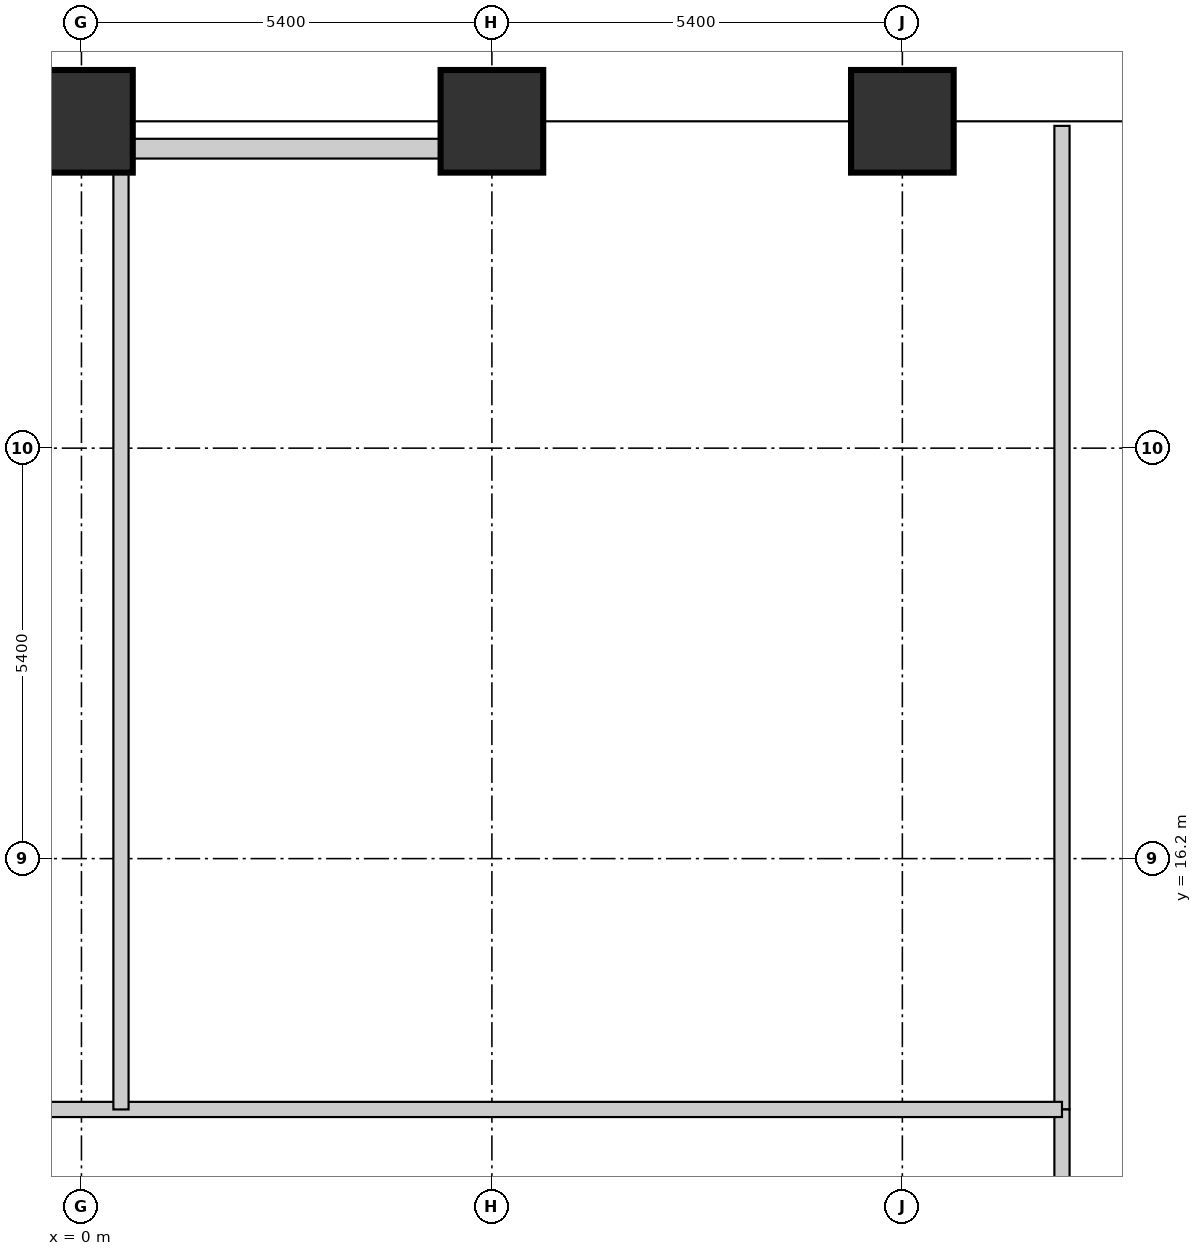
"""IFC4 building model, lengths in metres.
Left out: names, types, materials, properties, quantities, classifications, styles, units other than length and angle.
Written with IfcOpenShell. Run it as: python <this file> out.ifc"""

import sys

from ifc_helpers import new_model, si_unit, direction, frame, frame_2d, origin, origin_2d, place, context, subcontext, project, spatial, rectangle, extrude, element, fill, save


model = new_model("IFC4")
c1 = context("Model", 3, precision=1e-05, world=origin(), true_north=direction((0.0, 1.0)))
c2 = subcontext(c1, "Body", "Model", "MODEL_VIEW")
j1 = project(units=[si_unit("LENGTHUNIT", "METRE"), si_unit("PLANEANGLEUNIT", "RADIAN")], contexts=[c1])
p1 = place(None, origin())
s1 = spatial("IfcSite", under=j1, at=p1, CompositionType="ELEMENT")
p2 = place(p1, origin())
s2 = spatial("IfcBuilding", under=s1, at=p2, CompositionType="ELEMENT")
p3 = place(p2, frame((0.0, 0.0, 22.5)))
s3 = spatial("IfcBuildingStorey", under=s2, at=p3, CompositionType="ELEMENT", Elevation=22.5)
for number, where, z_axis, x_axis in (
    (1, (0.0, 25.9, 0.0), (0.0, 0.0, 1.0), (1.0, 0.0, 0.0)),
    (2, (5.4, 25.9, 0.0), (0.0, 0.0, 1.0), (1.0, 0.0, 0.0)),
    (3, (10.8, 25.9, 0.0), (0.0, 0.0, 1.0), (1.0, 0.0, 0.0)),
):
    element("IfcColumn", number, at=place(p3, frame(where, z_axis=z_axis, x_axis=x_axis)), inside=s3, PredefinedType="COLUMN", context=c2, shape_type="SweptSolid", body=[
        extrude(rectangle(XDim=1.35, YDim=1.35, at=origin_2d()), origin(), (0.0, 0.0, 1.0), 3.75),
    ])
p4 = place(p3, frame((4.727, 25.54, 0.0), z_axis=(0.0, 0.0, 1.0), x_axis=(-1.0, 0.0, 0.0)))
e4 = element("IfcWall", 4, at=p4, inside=s3, PredefinedType="STANDARD", context=c2, shape_type="SweptSolid", body=[
    extrude(rectangle(XDim=4.054, YDim=0.26, at=frame_2d((2.027, 0.0))), origin(), (0.0, 0.0, 1.0), 2.629),
])
p5 = place(p3, frame((12.9, 12.9, 0.0), z_axis=(0.0, 0.0, 1.0), x_axis=(0.0, 1.0, 0.0)))
e5 = element("IfcWall", 5, at=p5, inside=s3, PredefinedType="PARTITIONING", context=c2, shape_type="SweptSolid", body=[
    extrude(rectangle(XDim=12.94, YDim=0.2, at=frame_2d((6.47, 0.0))), origin(), (0.0, 0.0, 1.0), 2.629),
])
p6 = place(p3, frame((12.9, -11.04, 0.0), z_axis=(0.0, 0.0, 1.0), x_axis=(0.0, 1.0, 0.0)))
e6 = element("IfcWall", 6, at=p6, inside=s3, PredefinedType="PARTITIONING", context=c2, shape_type="SweptSolid", body=[
    extrude(rectangle(XDim=23.94, YDim=0.2, at=frame_2d((11.97, 0.0))), origin(), (0.0, 0.0, 1.0), 3.57),
])
p7 = place(p6, frame((2.9, 0.0, 0.0)))
e7 = element("IfcOpeningElement", 7, at=p7, cuts=e6, PredefinedType="OPENING", context=c2, shape_type="SweptSolid", body=[
    extrude(rectangle(XDim=0.85, YDim=2.1, at=frame_2d((0.425, 1.05))), frame((0.0, 0.11, 0.0), z_axis=(0.0, -1.0, 0.0), x_axis=(1.0, 0.0, 0.0)), (0.0, 0.0, 1.0), 0.22),
])
p8 = place(p6, frame((14.87, 0.0, 0.0)))
e8 = element("IfcOpeningElement", 8, at=p8, cuts=e6, PredefinedType="OPENING", context=c2, shape_type="SweptSolid", body=[
    extrude(rectangle(XDim=0.95, YDim=2.1, at=frame_2d((0.475, 1.05))), frame((0.0, 0.11, 0.0), z_axis=(0.0, -1.0, 0.0), x_axis=(1.0, 0.0, 0.0)), (0.0, 0.0, 1.0), 0.22),
])
p9 = place(p3, frame((-12.9, 12.9, 0.0), z_axis=(0.0, 0.0, 1.0), x_axis=(1.0, 0.0, 0.0)))
e9 = element("IfcWall", 9, at=p9, inside=s3, PredefinedType="PARTITIONING", context=c2, shape_type="SweptSolid", body=[
    extrude(rectangle(XDim=25.8, YDim=0.2, at=frame_2d((12.9, 0.0))), origin(), (0.0, 0.0, 1.0), 2.93),
])
p10 = place(p9, frame((4.347, 0.0, 0.0)))
e10 = element("IfcOpeningElement", 10, at=p10, cuts=e9, PredefinedType="OPENING", context=c2, shape_type="SweptSolid", body=[
    extrude(rectangle(XDim=0.85, YDim=2.1, at=frame_2d((0.425, 1.05))), frame((0.0, 0.11, 0.0), z_axis=(0.0, -1.0, 0.0), x_axis=(1.0, 0.0, 0.0)), (0.0, 0.0, 1.0), 0.22),
])
p11 = place(p9, frame((9.1, 0.0, 0.0)))
e11 = element("IfcOpeningElement", 11, at=p11, cuts=e9, PredefinedType="OPENING", context=c2, shape_type="SweptSolid", body=[
    extrude(rectangle(XDim=0.85, YDim=2.1, at=frame_2d((0.425, 1.05))), frame((0.0, 0.11, 0.0), z_axis=(0.0, -1.0, 0.0), x_axis=(1.0, 0.0, 0.0)), (0.0, 0.0, 1.0), 0.22),
])
p12 = place(p9, frame((19.16, 0.0, 0.0)))
e12 = element("IfcOpeningElement", 12, at=p12, cuts=e9, PredefinedType="OPENING", context=c2, shape_type="SweptSolid", body=[
    extrude(rectangle(XDim=0.95, YDim=2.1, at=frame_2d((0.475, 1.05))), frame((0.0, 0.11, 0.0), z_axis=(0.0, -1.0, 0.0), x_axis=(1.0, 0.0, 0.0)), (0.0, 0.0, 1.0), 0.22),
])
p13 = place(p3, frame((0.52, 12.9, 0.0), z_axis=(0.0, 0.0, 1.0), x_axis=(0.0, 1.0, 0.0)))
e13 = element("IfcWall", 13, at=p13, inside=s3, PredefinedType="PARTITIONING", context=c2, shape_type="SweptSolid", body=[
    extrude(rectangle(XDim=12.94, YDim=0.2, at=frame_2d((6.47, 0.0))), origin(), (0.0, 0.0, 1.0), 2.629),
])
p14 = place(p12, origin())
e14 = element("IfcDoor", 14, at=p14, inside=s3, OperationType="SINGLE_SWING_RIGHT", PredefinedType="DOOR", context=c2, shape_type="SweptSolid", body=[
    extrude(rectangle(XDim=0.95, YDim=2.1, at=frame_2d((0.475, 1.05))), frame((0.0, 0.025, 0.0), z_axis=(0.0, -1.0, 0.0), x_axis=(1.0, 0.0, 0.0)), (0.0, 0.0, 1.0), 0.05),
])
fill(e12, e14)
save(model, sys.argv[1])
